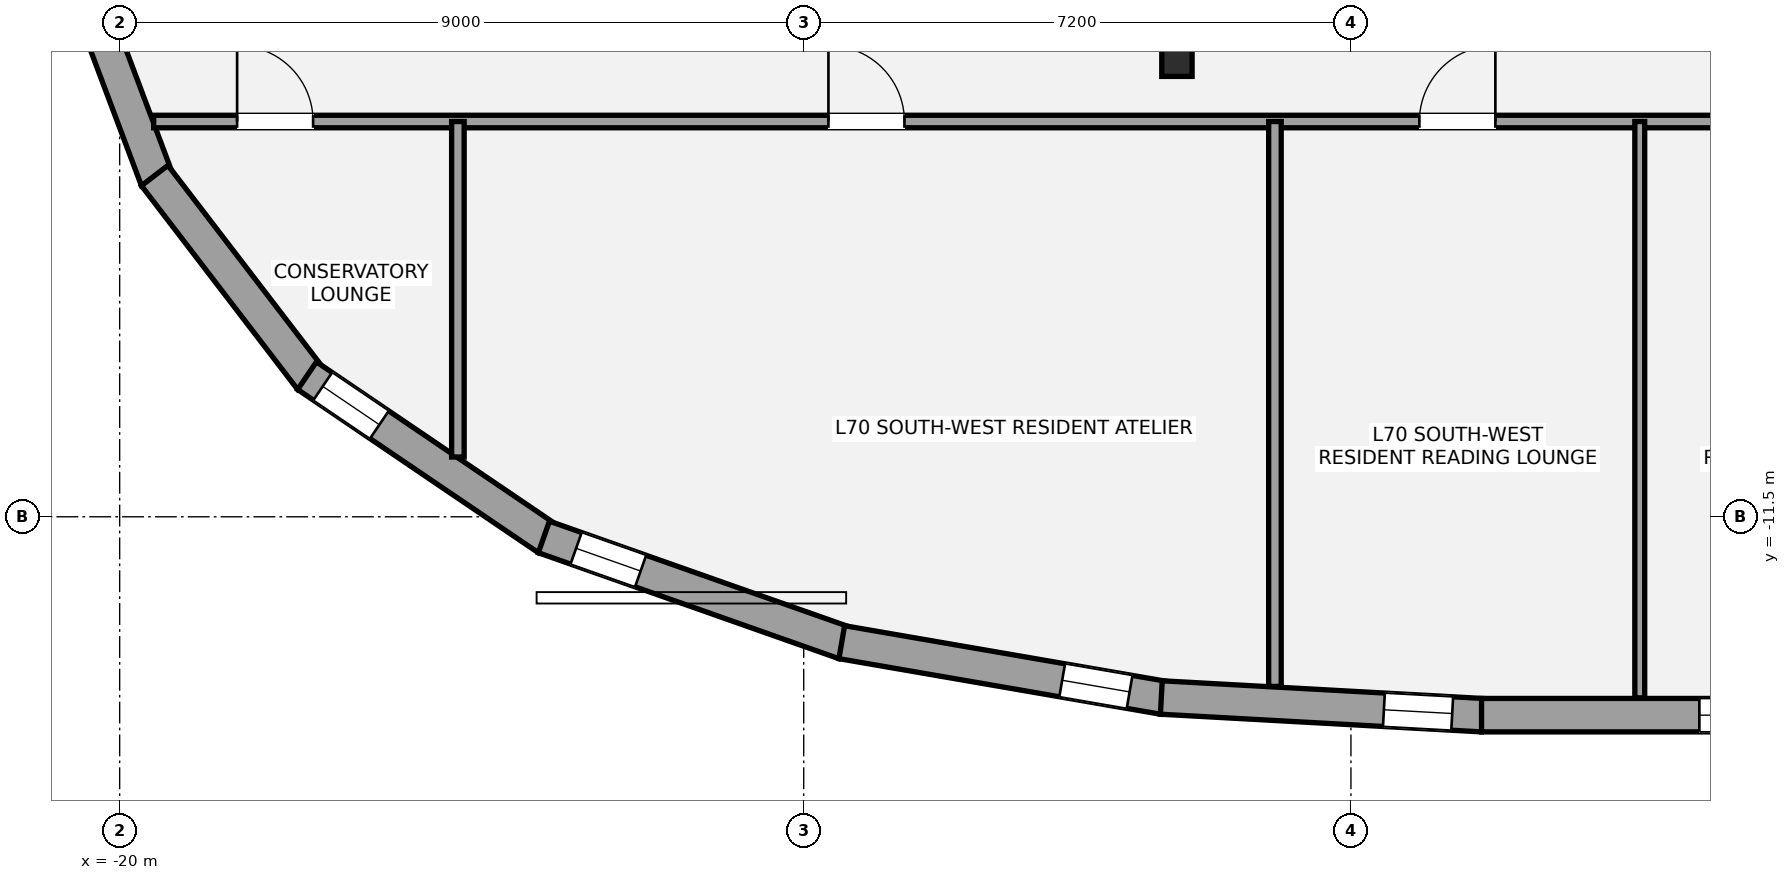
"""IFC4 building model, lengths in metres.
Left out: names, types, materials, properties, quantities, classifications, styles, units other than length and angle.
Written with IfcOpenShell. Run it as: python <this file> out.ifc"""

import sys

from ifc_helpers import new_model, si_unit, direction, frame, frame_2d, origin, origin_2d, place, context, subcontext, project, spatial, rectangle, i_section, extrude, element, fill, save


model = new_model("IFC4")
c1 = context("Model", 3, precision=1e-05, world=origin(), true_north=direction((0.0, 1.0)))
c2 = subcontext(c1, "Body", "Model", "MODEL_VIEW")
j1 = project(units=[si_unit("LENGTHUNIT", "METRE"), si_unit("PLANEANGLEUNIT", "RADIAN")], contexts=[c1])
p1 = place(None, origin())
s1 = spatial("IfcSite", under=j1, at=p1, CompositionType="ELEMENT")
p2 = place(p1, origin())
s2 = spatial("IfcBuilding", under=s1, at=p2, CompositionType="ELEMENT")
p3 = place(p2, frame((0.0, 0.0, 247.8)))
s3 = spatial("IfcBuildingStorey", under=s2, at=p3, CompositionType="ELEMENT", Elevation=247.8)
p4 = place(p3, frame((-6.09, -5.513, 0.0), z_axis=(0.0, 0.0, 1.0), x_axis=(1.0, 0.0, 0.0)))
e1 = element("IfcColumn", 1, at=p4, inside=s3, PredefinedType="COLUMN", context=c2, shape_type="SweptSolid", body=[
    extrude(i_section(OverallWidth=0.399, OverallDepth=0.387, WebThickness=0.021, FlangeThickness=0.033, at=origin_2d()), origin(), (0.0, 0.0, 1.0), 3.15),
])
p5 = place(p3, frame((-19.508, -7.067, 0.0), z_axis=(0.0, 0.0, 1.0), x_axis=(-0.351786989162, 0.936080078976, 0.0)))
e2 = element("IfcWall", 2, at=p5, inside=s3, PredefinedType="STANDARD", context=c2, shape_type="SweptSolid", body=[
    extrude(rectangle(XDim=3.064, YDim=0.44, at=frame_2d((1.532, 0.0))), origin(), (0.0, 0.0, 1.0), 2.336),
])
p6 = place(p3, frame((-17.483, -9.692, 0.0), z_axis=(0.0, 0.0, 1.0), x_axis=(-0.608417890777, 0.793616828314, 0.0)))
e3 = element("IfcWall", 3, at=p6, inside=s3, PredefinedType="STANDARD", context=c2, shape_type="SweptSolid", body=[
    extrude(rectangle(XDim=3.379, YDim=0.44, at=frame_2d((1.689, 0.0))), origin(), (0.0, 0.0, 1.0), 2.336),
])
p7 = place(p3, frame((-14.368, -11.791, 0.0), z_axis=(0.0, 0.0, 1.0), x_axis=(-0.827685387822, 0.56119239017, 0.0)))
e4 = element("IfcWall", 4, at=p7, inside=s3, PredefinedType="STANDARD", context=c2, shape_type="SweptSolid", body=[
    extrude(rectangle(XDim=3.826, YDim=0.44, at=frame_2d((1.913, 0.0))), origin(), (0.0, 0.0, 1.0), 2.336),
])
p8 = place(p7, frame((2.676, 0.0, 0.58)))
e5 = element("IfcOpeningElement", 5, at=p8, cuts=e4, PredefinedType="OPENING", context=c2, shape_type="SweptSolid", body=[
    extrude(rectangle(XDim=0.9, YDim=1.35, at=frame_2d((0.45, 0.675))), frame((0.0, 0.23, 0.0), z_axis=(0.0, -1.0, 0.0), x_axis=(1.0, 0.0, 0.0)), (0.0, 0.0, 1.0), 0.46),
])
p9 = place(p3, frame((-10.464, -13.159, 0.0), z_axis=(0.0, 0.0, 1.0), x_axis=(-0.943128925421, 0.332427180047, 0.0)))
e6 = element("IfcWall", 6, at=p9, inside=s3, PredefinedType="STANDARD", context=c2, shape_type="SweptSolid", body=[
    extrude(rectangle(XDim=4.193, YDim=0.44, at=frame_2d((2.096, 0.0))), origin(), (0.0, 0.0, 1.0), 2.336),
])
p10 = place(p9, frame((2.844, 0.0, 0.58)))
e7 = element("IfcOpeningElement", 7, at=p10, cuts=e6, PredefinedType="OPENING", context=c2, shape_type="SweptSolid", body=[
    extrude(rectangle(XDim=0.9, YDim=1.35, at=frame_2d((0.45, 0.675))), frame((0.0, 0.23, 0.0), z_axis=(0.0, -1.0, 0.0), x_axis=(1.0, 0.0, 0.0)), (0.0, 0.0, 1.0), 0.46),
])
p11 = place(p3, frame((-6.27, -13.881, 0.0), z_axis=(0.0, 0.0, 1.0), x_axis=(-0.985405225971, 0.170224970641, 0.0)))
e8 = element("IfcWall", 8, at=p11, inside=s3, PredefinedType="STANDARD", context=c2, shape_type="SweptSolid", body=[
    extrude(rectangle(XDim=4.293, YDim=0.44, at=frame_2d((2.146, 0.0))), origin(), (0.0, 0.0, 1.0), 2.336),
])
p12 = place(p11, frame((0.449, 0.0, 0.58)))
e9 = element("IfcOpeningElement", 9, at=p12, cuts=e8, PredefinedType="OPENING", context=c2, shape_type="SweptSolid", body=[
    extrude(rectangle(XDim=0.9, YDim=1.35, at=frame_2d((0.45, 0.675))), frame((0.0, 0.23, 0.0), z_axis=(0.0, -1.0, 0.0), x_axis=(1.0, 0.0, 0.0)), (0.0, 0.0, 1.0), 0.46),
])
p13 = place(p3, frame((-2.07, -14.11, 0.0), z_axis=(0.0, 0.0, 1.0), x_axis=(-0.998487393463, 0.05498113399, 0.0)))
e10 = element("IfcWall", 10, at=p13, inside=s3, PredefinedType="STANDARD", context=c2, shape_type="SweptSolid", body=[
    extrude(rectangle(XDim=4.232, YDim=0.44, at=frame_2d((2.116, 0.0))), origin(), (0.0, 0.0, 1.0), 2.336),
])
p14 = place(p13, frame((0.399, 0.0, 0.58)))
e11 = element("IfcOpeningElement", 11, at=p14, cuts=e10, PredefinedType="OPENING", context=c2, shape_type="SweptSolid", body=[
    extrude(rectangle(XDim=0.9, YDim=1.35, at=frame_2d((0.45, 0.675))), frame((0.0, 0.23, 0.0), z_axis=(0.0, -1.0, 0.0), x_axis=(1.0, 0.0, 0.0)), (0.0, 0.0, 1.0), 0.46),
])
p15 = place(p3, frame((2.082, -14.11, 0.0), z_axis=(0.0, 0.0, 1.0), x_axis=(-1.0, 0.0, 0.0)))
e12 = element("IfcWall", 12, at=p15, inside=s3, PredefinedType="STANDARD", context=c2, shape_type="SweptSolid", body=[
    extrude(rectangle(XDim=4.163, YDim=0.44, at=frame_2d((2.082, 0.0))), origin(), (0.0, 0.0, 1.0), 2.336),
])
p16 = place(p15, frame((0.397, 0.0, 0.58)))
e13 = element("IfcOpeningElement", 13, at=p16, cuts=e12, PredefinedType="OPENING", context=c2, shape_type="SweptSolid", body=[
    extrude(rectangle(XDim=0.9, YDim=1.35, at=frame_2d((0.45, 0.675))), frame((0.0, 0.23, 0.0), z_axis=(0.0, -1.0, 0.0), x_axis=(1.0, 0.0, 0.0)), (0.0, 0.0, 1.0), 0.46),
])
p17 = place(p3, frame((-19.552, -6.3, 0.0), z_axis=(0.0, 0.0, 1.0), x_axis=(1.0, 0.0, 0.0)))
e14 = element("IfcWall", 14, at=p17, inside=s3, PredefinedType="PARTITIONING", context=c2, shape_type="SweptSolid", body=[
    extrude(rectangle(XDim=39.105, YDim=0.165, at=frame_2d((19.552, 0.0))), origin(), (0.0, 0.0, 1.0), 2.423),
])
p18 = place(p17, frame((1.098, 0.0, 0.0)))
e15 = element("IfcOpeningElement", 15, at=p18, cuts=e14, PredefinedType="OPENING", context=c2, shape_type="SweptSolid", body=[
    extrude(rectangle(XDim=1.0, YDim=2.15, at=frame_2d((0.5, 1.075))), frame((0.0, 0.093, 0.0), z_axis=(0.0, -1.0, 0.0), x_axis=(1.0, 0.0, 0.0)), (0.0, 0.0, 1.0), 0.185),
])
p19 = place(p17, frame((37.212, 0.0, 0.0)))
e16 = element("IfcOpeningElement", 16, at=p19, cuts=e14, PredefinedType="OPENING", context=c2, shape_type="SweptSolid", body=[
    extrude(rectangle(XDim=1.0, YDim=2.15, at=frame_2d((0.5, 1.075))), frame((0.0, 0.093, 0.0), z_axis=(0.0, -1.0, 0.0), x_axis=(1.0, 0.0, 0.0)), (0.0, 0.0, 1.0), 0.185),
])
p20 = place(p17, frame((16.653, 0.0, 0.0)))
e17 = element("IfcOpeningElement", 17, at=p20, cuts=e14, PredefinedType="OPENING", context=c2, shape_type="SweptSolid", body=[
    extrude(rectangle(XDim=1.0, YDim=2.15, at=frame_2d((0.5, 1.075))), frame((0.0, 0.093, 0.0), z_axis=(0.0, -1.0, 0.0), x_axis=(1.0, 0.0, 0.0)), (0.0, 0.0, 1.0), 0.185),
])
p21 = place(p17, frame((21.453, 0.0, 0.0)))
e18 = element("IfcOpeningElement", 18, at=p21, cuts=e14, PredefinedType="OPENING", context=c2, shape_type="SweptSolid", body=[
    extrude(rectangle(XDim=1.0, YDim=2.15, at=frame_2d((0.5, 1.075))), frame((0.0, 0.093, 0.0), z_axis=(0.0, -1.0, 0.0), x_axis=(1.0, 0.0, 0.0)), (0.0, 0.0, 1.0), 0.185),
])
p22 = place(p17, frame((8.878, 0.0, 0.0)))
e19 = element("IfcOpeningElement", 19, at=p22, cuts=e14, PredefinedType="OPENING", context=c2, shape_type="SweptSolid", body=[
    extrude(rectangle(XDim=1.0, YDim=2.15, at=frame_2d((0.5, 1.075))), frame((0.0, 0.093, 0.0), z_axis=(0.0, -1.0, 0.0), x_axis=(1.0, 0.0, 0.0)), (0.0, 0.0, 1.0), 0.185),
])
p23 = place(p17, frame((29.553, 0.0, 0.0)))
e20 = element("IfcOpeningElement", 20, at=p23, cuts=e14, PredefinedType="OPENING", context=c2, shape_type="SweptSolid", body=[
    extrude(rectangle(XDim=1.0, YDim=2.15, at=frame_2d((0.5, 1.075))), frame((0.0, 0.093, 0.0), z_axis=(0.0, -1.0, 0.0), x_axis=(1.0, 0.0, 0.0)), (0.0, 0.0, 1.0), 0.185),
])
p24 = place(p3, frame((-15.55, -10.714, 0.0), z_axis=(0.0, 0.0, 1.0), x_axis=(0.0, 1.0, 0.0)))
e21 = element("IfcWall", 21, at=p24, inside=s3, PredefinedType="PARTITIONING", context=c2, shape_type="SweptSolid", body=[
    extrude(rectangle(XDim=4.414, YDim=0.165, at=frame_2d((2.207, 0.0))), origin(), (0.0, 0.0, 1.0), 2.97),
])
p25 = place(p3, frame((-4.8, -13.732, 0.0), z_axis=(0.0, 0.0, 1.0), x_axis=(0.0, 1.0, 0.0)))
e22 = element("IfcWall", 22, at=p25, inside=s3, PredefinedType="PARTITIONING", context=c2, shape_type="SweptSolid", body=[
    extrude(rectangle(XDim=7.432, YDim=0.165, at=frame_2d((3.716, 0.0))), origin(), (0.0, 0.0, 1.0), 2.423),
])
p26 = place(p3, frame((0.0, -13.882, 0.0), z_axis=(0.0, 0.0, 1.0), x_axis=(0.0, 1.0, 0.0)))
e23 = element("IfcWall", 23, at=p26, inside=s3, PredefinedType="PARTITIONING", context=c2, shape_type="SweptSolid", body=[
    extrude(rectangle(XDim=7.582, YDim=0.13, at=frame_2d((3.791, 0.0))), origin(), (0.0, 0.0, 1.0), 2.423),
])
p27 = place(p8, origin())
e24 = element("IfcWindow", 24, at=p27, inside=s3, PartitioningType="SINGLE_PANEL", PredefinedType="WINDOW", context=c2, shape_type="SweptSolid", body=[
    extrude(rectangle(XDim=0.9, YDim=1.35, at=frame_2d((0.45, 0.675))), frame((0.0, -0.01, 0.0), z_axis=(0.0, -1.0, 0.0), x_axis=(1.0, 0.0, 0.0)), (0.0, 0.0, 1.0), 0.06),
])
fill(e5, e24)
p28 = place(p10, origin())
e25 = element("IfcWindow", 25, at=p28, inside=s3, PartitioningType="SINGLE_PANEL", PredefinedType="WINDOW", context=c2, shape_type="SweptSolid", body=[
    extrude(rectangle(XDim=0.9, YDim=1.35, at=frame_2d((0.45, 0.675))), frame((0.0, -0.01, 0.0), z_axis=(0.0, -1.0, 0.0), x_axis=(1.0, 0.0, 0.0)), (0.0, 0.0, 1.0), 0.06),
])
fill(e7, e25)
p29 = place(p12, origin())
e26 = element("IfcWindow", 26, at=p29, inside=s3, PartitioningType="SINGLE_PANEL", PredefinedType="WINDOW", context=c2, shape_type="SweptSolid", body=[
    extrude(rectangle(XDim=0.9, YDim=1.35, at=frame_2d((0.45, 0.675))), frame((0.0, -0.01, 0.0), z_axis=(0.0, -1.0, 0.0), x_axis=(1.0, 0.0, 0.0)), (0.0, 0.0, 1.0), 0.06),
])
fill(e9, e26)
p30 = place(p14, origin())
e27 = element("IfcWindow", 27, at=p30, inside=s3, PartitioningType="SINGLE_PANEL", PredefinedType="WINDOW", context=c2, shape_type="SweptSolid", body=[
    extrude(rectangle(XDim=0.9, YDim=1.35, at=frame_2d((0.45, 0.675))), frame((0.0, -0.01, 0.0), z_axis=(0.0, -1.0, 0.0), x_axis=(1.0, 0.0, 0.0)), (0.0, 0.0, 1.0), 0.06),
])
fill(e11, e27)
p31 = place(p16, origin())
e28 = element("IfcWindow", 28, at=p31, inside=s3, PartitioningType="SINGLE_PANEL", PredefinedType="WINDOW", context=c2, shape_type="SweptSolid", body=[
    extrude(rectangle(XDim=0.9, YDim=1.35, at=frame_2d((0.45, 0.675))), frame((0.0, -0.01, 0.0), z_axis=(0.0, -1.0, 0.0), x_axis=(1.0, 0.0, 0.0)), (0.0, 0.0, 1.0), 0.06),
])
fill(e13, e28)
p32 = place(p18, origin())
e29 = element("IfcDoor", 29, at=p32, inside=s3, OperationType="SINGLE_SWING_LEFT", PredefinedType="DOOR", context=c2, shape_type="SweptSolid", body=[
    extrude(rectangle(XDim=1.0, YDim=2.15, at=frame_2d((0.5, 1.075))), frame((0.0, 0.025, 0.0), z_axis=(0.0, -1.0, 0.0), x_axis=(1.0, 0.0, 0.0)), (0.0, 0.0, 1.0), 0.05),
])
fill(e15, e29)
p33 = place(p20, origin())
e30 = element("IfcDoor", 30, at=p33, inside=s3, OperationType="SINGLE_SWING_RIGHT", PredefinedType="DOOR", context=c2, shape_type="SweptSolid", body=[
    extrude(rectangle(XDim=1.0, YDim=2.15, at=frame_2d((0.5, 1.075))), frame((0.0, 0.025, 0.0), z_axis=(0.0, -1.0, 0.0), x_axis=(1.0, 0.0, 0.0)), (0.0, 0.0, 1.0), 0.05),
])
fill(e17, e30)
p34 = place(p22, origin())
e31 = element("IfcDoor", 31, at=p34, inside=s3, OperationType="SINGLE_SWING_LEFT", PredefinedType="DOOR", context=c2, shape_type="SweptSolid", body=[
    extrude(rectangle(XDim=1.0, YDim=2.15, at=frame_2d((0.5, 1.075))), frame((0.0, 0.025, 0.0), z_axis=(0.0, -1.0, 0.0), x_axis=(1.0, 0.0, 0.0)), (0.0, 0.0, 1.0), 0.05),
])
fill(e19, e31)
save(model, sys.argv[1])
